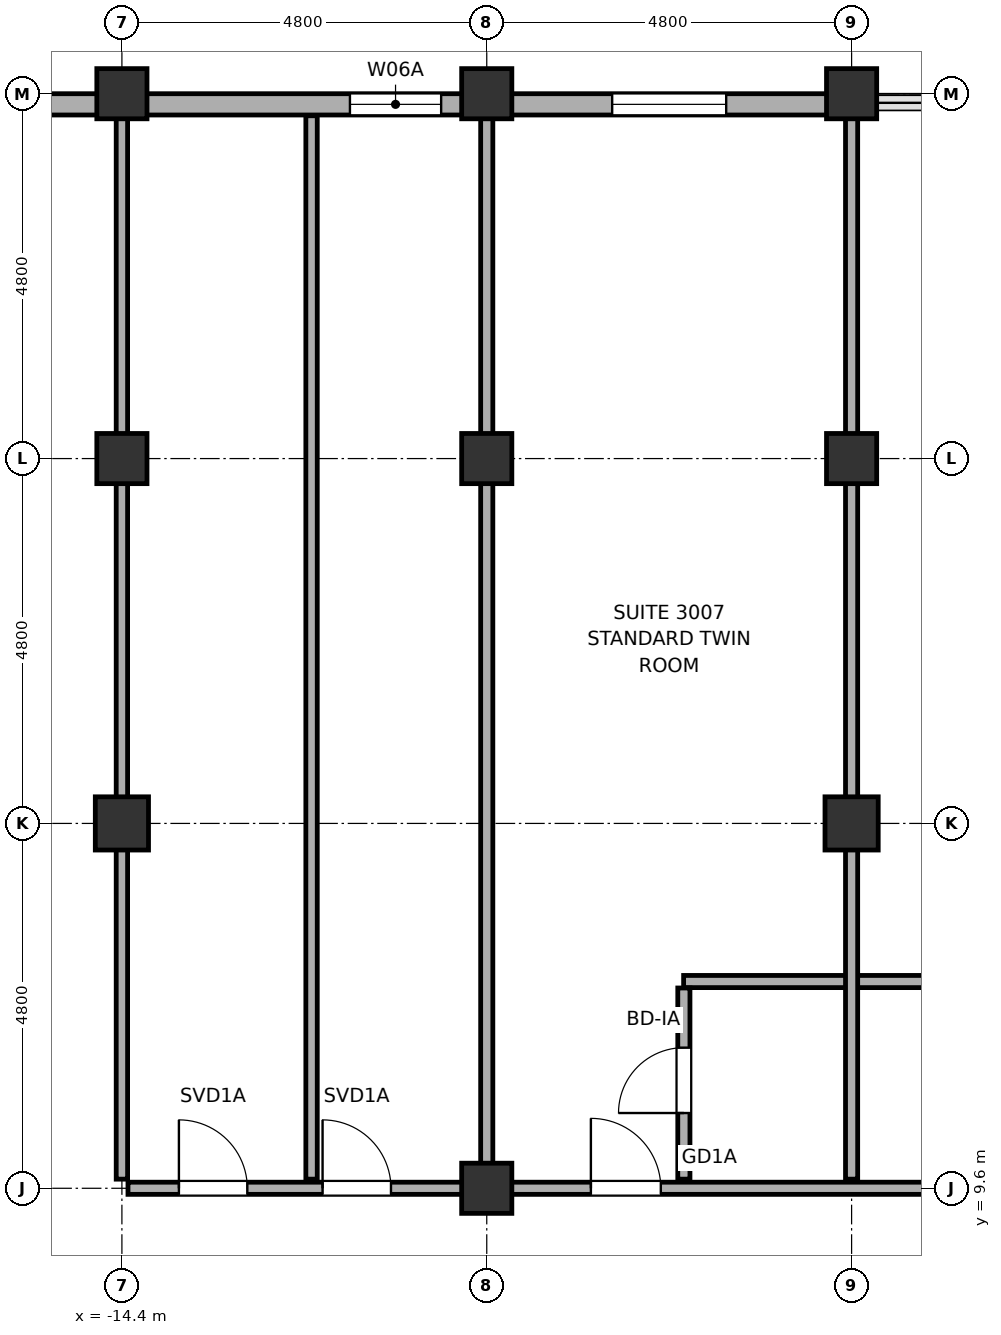
"""IFC4 building model, lengths in metres.
Left out: names, types, materials, properties, quantities, classifications, styles, units other than length and angle.
Written with IfcOpenShell. Run it as: python <this file> out.ifc"""

import sys

from ifc_helpers import new_model, si_unit, direction, frame, frame_2d, origin, origin_2d, place, context, subcontext, project, spatial, rectangle, hollow_rectangle, hollow_circle, extrude, element, fill, save


model = new_model("IFC4")
c1 = context("Model", 3, precision=1e-05, world=origin(), true_north=direction((0.0, 1.0)))
c2 = subcontext(c1, "Body", "Model", "MODEL_VIEW")
j1 = project(units=[si_unit("LENGTHUNIT", "METRE"), si_unit("PLANEANGLEUNIT", "RADIAN")], contexts=[c1])
p1 = place(None, origin())
s1 = spatial("IfcSite", under=j1, at=p1, CompositionType="ELEMENT")
p2 = place(p1, origin())
s2 = spatial("IfcBuilding", under=s1, at=p2, CompositionType="ELEMENT")
p3 = place(p2, frame((0.0, 0.0, 124.8)))
s3 = spatial("IfcBuildingStorey", under=s2, at=p3, CompositionType="ELEMENT", Elevation=124.8)
p4 = place(p3, frame((-14.4, 14.4, 0.0), z_axis=(0.0, 0.0, 1.0), x_axis=(1.0, 0.0, 0.0)))
e1 = element("IfcColumn", 1, at=p4, inside=s3, PredefinedType="COLUMN", context=c2, shape_type="SweptSolid", body=[
    extrude(hollow_rectangle(XDim=0.7, YDim=0.7, WallThickness=0.032, at=origin_2d()), origin(), (0.0, 0.0, 1.0), 3.7),
])
for number, where, z_axis, x_axis in (
    (2, (-14.4, 19.2, 0.0), (0.0, 0.0, 1.0), (1.0, 0.0, 0.0)),
    (3, (-14.4, 24.0, 0.0), (0.0, 0.0, 1.0), (1.0, 0.0, 0.0)),
    (4, (-9.6, 9.6, 0.0), (0.0, 0.0, 1.0), (1.0, 0.0, 0.0)),
    (5, (-9.6, 19.2, 0.0), (0.0, 0.0, 1.0), (1.0, 0.0, 0.0)),
    (6, (-9.6, 24.0, 0.0), (0.0, 0.0, 1.0), (1.0, 0.0, 0.0)),
):
    element("IfcColumn", number, at=place(p3, frame(where, z_axis=z_axis, x_axis=x_axis)), inside=s3, PredefinedType="COLUMN", context=c2, shape_type="SweptSolid", body=[
        extrude(hollow_circle(Radius=0.33, WallThickness=0.028, at=origin_2d()), origin(), (0.0, 0.0, 1.0), 3.7),
    ])
p5 = place(p3, frame((-4.8, 14.4, 0.0), z_axis=(0.0, 0.0, 1.0), x_axis=(1.0, 0.0, 0.0)))
e7 = element("IfcColumn", 7, at=p5, inside=s3, PredefinedType="COLUMN", context=c2, shape_type="SweptSolid", body=[
    extrude(hollow_rectangle(XDim=0.7, YDim=0.7, WallThickness=0.032, at=origin_2d()), origin(), (0.0, 0.0, 1.0), 3.7),
])
for number, where, z_axis, x_axis in (
    (8, (-4.8, 19.2, 0.0), (0.0, 0.0, 1.0), (1.0, 0.0, 0.0)),
    (9, (-4.8, 24.0, 0.0), (0.0, 0.0, 1.0), (1.0, 0.0, 0.0)),
):
    element("IfcColumn", number, at=place(p3, frame(where, z_axis=z_axis, x_axis=x_axis)), inside=s3, PredefinedType="COLUMN", context=c2, shape_type="SweptSolid", body=[
        extrude(hollow_circle(Radius=0.33, WallThickness=0.028, at=origin_2d()), origin(), (0.0, 0.0, 1.0), 3.7),
    ])
p6 = place(p3, frame((-30.0, 23.86, 0.0), z_axis=(0.0, 0.0, 1.0), x_axis=(1.0, 0.0, 0.0)))
e10 = element("IfcWall", 10, at=p6, inside=s3, PredefinedType="SOLIDWALL", context=c2, shape_type="SweptSolid", body=[
    extrude(rectangle(XDim=25.25, YDim=0.28, at=frame_2d((12.625, 0.0))), origin(), (0.0, 0.0, 1.0), 2.12),
])
p7 = place(p6, frame((7.65, 0.0, 0.75)))
e11 = element("IfcOpeningElement", 11, at=p7, cuts=e10, PredefinedType="OPENING", context=c2, shape_type="SweptSolid", body=[
    extrude(rectangle(XDim=1.5, YDim=1.15, at=frame_2d((0.75, 0.575))), frame((0.0, 0.155, 0.0), z_axis=(0.0, -1.0, 0.0), x_axis=(1.0, 0.0, 0.0)), (0.0, 0.0, 1.0), 0.31),
])
p8 = place(p6, frame((18.6, 0.0, 0.75)))
e12 = element("IfcOpeningElement", 12, at=p8, cuts=e10, PredefinedType="OPENING", context=c2, shape_type="SweptSolid", body=[
    extrude(rectangle(XDim=1.2, YDim=1.15, at=frame_2d((0.6, 0.575))), frame((0.0, 0.155, 0.0), z_axis=(0.0, -1.0, 0.0), x_axis=(1.0, 0.0, 0.0)), (0.0, 0.0, 1.0), 0.31),
])
p9 = place(p6, frame((22.05, 0.0, 0.75)))
e13 = element("IfcOpeningElement", 13, at=p9, cuts=e10, PredefinedType="OPENING", context=c2, shape_type="SweptSolid", body=[
    extrude(rectangle(XDim=1.5, YDim=1.15, at=frame_2d((0.75, 0.575))), frame((0.0, 0.155, 0.0), z_axis=(0.0, -1.0, 0.0), x_axis=(1.0, 0.0, 0.0)), (0.0, 0.0, 1.0), 0.31),
])
p10 = place(p3, frame((-14.32, 9.6, 0.0), z_axis=(0.0, 0.0, 1.0), x_axis=(1.0, 0.0, 0.0)))
e14 = element("IfcWall", 14, at=p10, inside=s3, PredefinedType="PARTITIONING", context=c2, shape_type="SweptSolid", body=[
    extrude(rectangle(XDim=42.95, YDim=0.16, at=frame_2d((21.475, 0.0))), origin(), (0.0, 0.0, 1.0), 2.12),
])
p11 = place(p10, frame((35.47, 0.0, 0.0)))
e15 = element("IfcOpeningElement", 15, at=p11, cuts=e14, PredefinedType="OPENING", context=c2, shape_type="SweptSolid", body=[
    extrude(rectangle(XDim=0.9, YDim=2.02, at=frame_2d((0.45, 1.01))), frame((0.0, 0.095, 0.0), z_axis=(0.0, -1.0, 0.0), x_axis=(1.0, 0.0, 0.0)), (0.0, 0.0, 1.0), 0.19),
])
p12 = place(p10, frame((0.67, 0.0, 0.0)))
e16 = element("IfcOpeningElement", 16, at=p12, cuts=e14, PredefinedType="OPENING", context=c2, shape_type="SweptSolid", body=[
    extrude(rectangle(XDim=0.9, YDim=2.02, at=frame_2d((0.45, 1.01))), frame((0.0, 0.095, 0.0), z_axis=(0.0, -1.0, 0.0), x_axis=(1.0, 0.0, 0.0)), (0.0, 0.0, 1.0), 0.19),
])
p13 = place(p10, frame((2.56, 0.0, 0.0)))
e17 = element("IfcOpeningElement", 17, at=p13, cuts=e14, PredefinedType="OPENING", context=c2, shape_type="SweptSolid", body=[
    extrude(rectangle(XDim=0.9, YDim=2.02, at=frame_2d((0.45, 1.01))), frame((0.0, 0.095, 0.0), z_axis=(0.0, -1.0, 0.0), x_axis=(1.0, 0.0, 0.0)), (0.0, 0.0, 1.0), 0.19),
])
p14 = place(p10, frame((6.09, 0.0, 0.0)))
e18 = element("IfcOpeningElement", 18, at=p14, cuts=e14, PredefinedType="OPENING", context=c2, shape_type="SweptSolid", body=[
    extrude(rectangle(XDim=0.92, YDim=2.02, at=frame_2d((0.46, 1.01))), frame((0.0, 0.095, 0.0), z_axis=(0.0, -1.0, 0.0), x_axis=(1.0, 0.0, 0.0)), (0.0, 0.0, 1.0), 0.19),
])
p15 = place(p10, frame((12.03, 0.0, 0.0)))
e19 = element("IfcOpeningElement", 19, at=p15, cuts=e14, PredefinedType="OPENING", context=c2, shape_type="SweptSolid", body=[
    extrude(rectangle(XDim=0.92, YDim=2.02, at=frame_2d((0.46, 1.01))), frame((0.0, 0.095, 0.0), z_axis=(0.0, -1.0, 0.0), x_axis=(1.0, 0.0, 0.0)), (0.0, 0.0, 1.0), 0.19),
])
p16 = place(p10, frame((15.69, 0.0, 0.0)))
e20 = element("IfcOpeningElement", 20, at=p16, cuts=e14, PredefinedType="OPENING", context=c2, shape_type="SweptSolid", body=[
    extrude(rectangle(XDim=0.92, YDim=2.02, at=frame_2d((0.46, 1.01))), frame((0.0, 0.095, 0.0), z_axis=(0.0, -1.0, 0.0), x_axis=(1.0, 0.0, 0.0)), (0.0, 0.0, 1.0), 0.19),
])
p17 = place(p10, frame((21.63, 0.0, 0.0)))
e21 = element("IfcOpeningElement", 21, at=p17, cuts=e14, PredefinedType="OPENING", context=c2, shape_type="SweptSolid", body=[
    extrude(rectangle(XDim=0.92, YDim=2.02, at=frame_2d((0.46, 1.01))), frame((0.0, 0.095, 0.0), z_axis=(0.0, -1.0, 0.0), x_axis=(1.0, 0.0, 0.0)), (0.0, 0.0, 1.0), 0.19),
])
p18 = place(p10, frame((25.29, 0.0, 0.0)))
e22 = element("IfcOpeningElement", 22, at=p18, cuts=e14, PredefinedType="OPENING", context=c2, shape_type="SweptSolid", body=[
    extrude(rectangle(XDim=0.92, YDim=2.02, at=frame_2d((0.46, 1.01))), frame((0.0, 0.095, 0.0), z_axis=(0.0, -1.0, 0.0), x_axis=(1.0, 0.0, 0.0)), (0.0, 0.0, 1.0), 0.19),
])
p19 = place(p3, frame((-7.01, 12.32, 0.0), z_axis=(0.0, 0.0, 1.0), x_axis=(1.0, 0.0, 0.0)))
e23 = element("IfcWall", 23, at=p19, inside=s3, PredefinedType="PARTITIONING", context=c2, shape_type="SweptSolid", body=[
    extrude(rectangle(XDim=4.42, YDim=0.16, at=frame_2d((2.21, 0.0))), origin(), (0.0, 0.0, 1.0), 2.87),
])
for number, where, z_axis, x_axis in (
    (24, (-14.4, 9.72, 0.0), (0.0, 0.0, 1.0), (0.0, 1.0, 0.0)),
    (25, (-11.905, 9.72, 0.0), (0.0, 0.0, 1.0), (0.0, 1.0, 0.0)),
):
    element("IfcWall", number, at=place(p3, frame(where, z_axis=z_axis, x_axis=x_axis)), inside=s3, PredefinedType="PARTITIONING", context=c2, shape_type="SweptSolid", body=[
        extrude(rectangle(XDim=13.99, YDim=0.15, at=frame_2d((6.995, 0.0))), origin(), (0.0, 0.0, 1.0), 2.12),
    ])
p20 = place(p3, frame((-9.6, 9.72, 0.0), z_axis=(0.0, 0.0, 1.0), x_axis=(0.0, 1.0, 0.0)))
e26 = element("IfcWall", 26, at=p20, inside=s3, PredefinedType="PARTITIONING", context=c2, shape_type="SweptSolid", body=[
    extrude(rectangle(XDim=13.99, YDim=0.16, at=frame_2d((6.995, 0.0))), origin(), (0.0, 0.0, 1.0), 2.12),
])
p21 = place(p3, frame((-7.007, 9.72, 0.0), z_axis=(0.0, 0.0, 1.0), x_axis=(0.0, 1.0, 0.0)))
e27 = element("IfcWall", 27, at=p21, inside=s3, PredefinedType="PARTITIONING", context=c2, shape_type="SweptSolid", body=[
    extrude(rectangle(XDim=2.515, YDim=0.16, at=frame_2d((1.258, 0.0))), origin(), (0.0, 0.0, 1.0), 2.12),
])
p22 = place(p21, frame((0.87, 0.0, 0.0)))
e28 = element("IfcOpeningElement", 28, at=p22, cuts=e27, PredefinedType="OPENING", context=c2, shape_type="SweptSolid", body=[
    extrude(rectangle(XDim=0.86, YDim=2.02, at=frame_2d((0.43, 1.01))), frame((0.0, 0.095, 0.0), z_axis=(0.0, -1.0, 0.0), x_axis=(1.0, 0.0, 0.0)), (0.0, 0.0, 1.0), 0.19),
])
p23 = place(p3, frame((-4.8, 9.72, 0.0), z_axis=(0.0, 0.0, 1.0), x_axis=(0.0, 1.0, 0.0)))
e29 = element("IfcWall", 29, at=p23, inside=s3, PredefinedType="PARTITIONING", context=c2, shape_type="SweptSolid", body=[
    extrude(rectangle(XDim=13.99, YDim=0.16, at=frame_2d((6.995, 0.0))), origin(), (0.0, 0.0, 1.0), 2.12),
])
p24 = place(p8, origin())
e30 = element("IfcWindow", 30, at=p24, inside=s3, PartitioningType="SINGLE_PANEL", PredefinedType="WINDOW", context=c2, shape_type="SweptSolid", body=[
    extrude(rectangle(XDim=1.2, YDim=1.15, at=frame_2d((0.6, 0.575))), frame((0.0, 0.03, 0.0), z_axis=(0.0, -1.0, 0.0), x_axis=(1.0, 0.0, 0.0)), (0.0, 0.0, 1.0), 0.06),
])
fill(e12, e30)
p25 = place(p9, origin())
e31 = element("IfcWindow", 31, at=p25, inside=s3, PartitioningType="SINGLE_PANEL", PredefinedType="WINDOW", context=c2, shape_type="SweptSolid", body=[
    extrude(rectangle(XDim=1.5, YDim=1.15, at=frame_2d((0.75, 0.575))), frame((0.0, 0.03, 0.0), z_axis=(0.0, -1.0, 0.0), x_axis=(1.0, 0.0, 0.0)), (0.0, 0.0, 1.0), 0.06),
])
fill(e13, e31)
p26 = place(p12, origin())
e32 = element("IfcDoor", 32, at=p26, inside=s3, OperationType="SINGLE_SWING_RIGHT", PredefinedType="DOOR", context=c2, shape_type="SweptSolid", body=[
    extrude(rectangle(XDim=0.9, YDim=2.02, at=frame_2d((0.45, 1.01))), frame((0.0, 0.025, 0.0), z_axis=(0.0, -1.0, 0.0), x_axis=(1.0, 0.0, 0.0)), (0.0, 0.0, 1.0), 0.05),
])
fill(e16, e32)
p27 = place(p13, origin())
e33 = element("IfcDoor", 33, at=p27, inside=s3, OperationType="SINGLE_SWING_LEFT", PredefinedType="DOOR", context=c2, shape_type="SweptSolid", body=[
    extrude(rectangle(XDim=0.9, YDim=2.02, at=frame_2d((0.45, 1.01))), frame((0.0, 0.025, 0.0), z_axis=(0.0, -1.0, 0.0), x_axis=(1.0, 0.0, 0.0)), (0.0, 0.0, 1.0), 0.05),
])
fill(e17, e33)
p28 = place(p14, origin())
e34 = element("IfcDoor", 34, at=p28, inside=s3, OperationType="SINGLE_SWING_RIGHT", PredefinedType="DOOR", context=c2, shape_type="SweptSolid", body=[
    extrude(rectangle(XDim=0.92, YDim=2.02, at=frame_2d((0.46, 1.01))), frame((0.0, 0.025, 0.0), z_axis=(0.0, -1.0, 0.0), x_axis=(1.0, 0.0, 0.0)), (0.0, 0.0, 1.0), 0.05),
])
fill(e18, e34)
p29 = place(p22, origin())
e35 = element("IfcDoor", 35, at=p29, inside=s3, OperationType="SINGLE_SWING_RIGHT", PredefinedType="DOOR", context=c2, shape_type="SweptSolid", body=[
    extrude(rectangle(XDim=0.86, YDim=2.02, at=frame_2d((0.43, 1.01))), frame((0.0, 0.025, 0.0), z_axis=(0.0, -1.0, 0.0), x_axis=(1.0, 0.0, 0.0)), (0.0, 0.0, 1.0), 0.05),
])
fill(e28, e35)
save(model, sys.argv[1])
